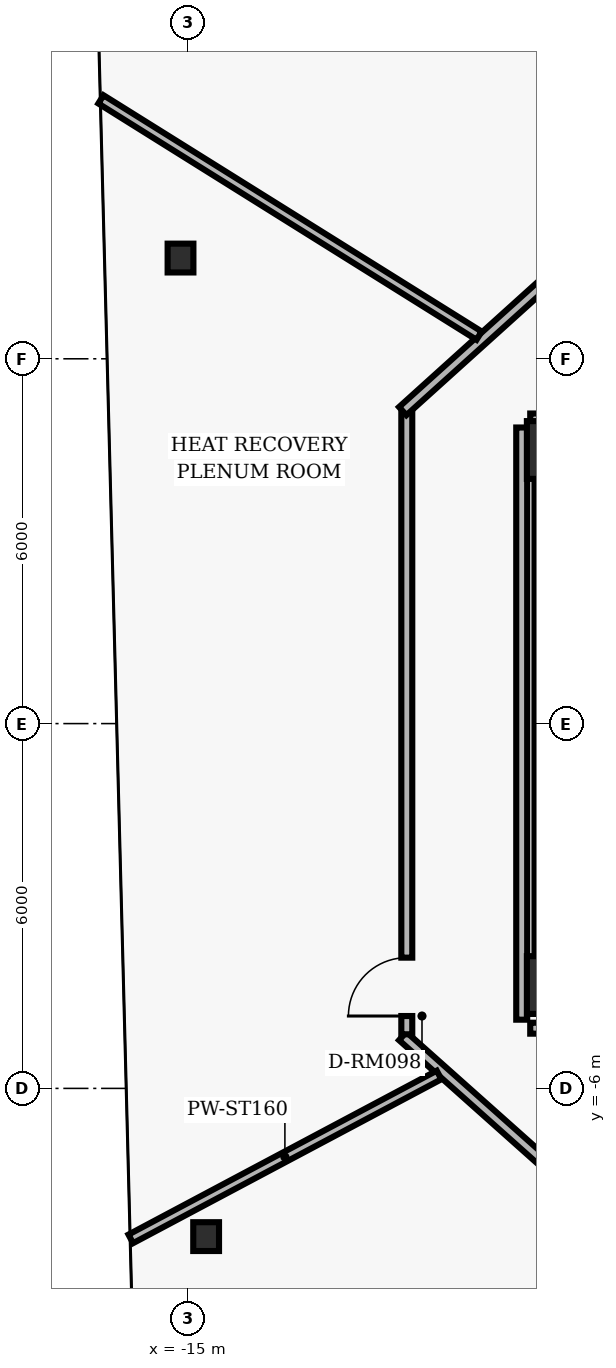
"""IFC4 building model, lengths in metres.
Left out: names, types, materials, properties, quantities, classifications, styles, units other than length and angle.
Written with IfcOpenShell. Run it as: python <this file> out.ifc"""

import sys

from ifc_helpers import new_model, si_unit, direction, frame, frame_2d, origin, origin_2d, place, context, subcontext, project, spatial, rectangle, hollow_rectangle, i_section, extrude, element, fill, save


model = new_model("IFC4")
c1 = context("Model", 3, precision=1e-05, world=origin(), true_north=direction((0.0, 1.0)))
c2 = subcontext(c1, "Body", "Model", "MODEL_VIEW")
j1 = project(units=[si_unit("LENGTHUNIT", "METRE"), si_unit("PLANEANGLEUNIT", "RADIAN")], contexts=[c1])
p1 = place(None, origin())
s1 = spatial("IfcSite", under=j1, at=p1, CompositionType="ELEMENT")
p2 = place(p1, origin())
s2 = spatial("IfcBuilding", under=s1, at=p2, CompositionType="ELEMENT")
p3 = place(p2, frame((0.0, 0.0, 45.76)))
s3 = spatial("IfcBuildingStorey", under=s2, at=p3, CompositionType="ELEMENT", Elevation=45.76)
for number, where, z_axis, x_axis in (
    (1, (-8.95, 4.5, 0.0), (0.0, 0.0, 1.0), (1.0, 0.0, 0.0)),
    (2, (-8.95, -4.3, 0.0), (0.0, 0.0, 1.0), (1.0, 0.0, 0.0)),
):
    element("IfcColumn", number, at=place(p3, frame(where, z_axis=z_axis, x_axis=x_axis)), inside=s3, PredefinedType="COLUMN", context=c2, shape_type="SweptSolid", body=[
        extrude(hollow_rectangle(XDim=0.95, YDim=0.95, WallThickness=0.06, InnerFilletRadius=0.02, OuterFilletRadius=0.04, at=origin_2d()), origin(), (0.0, 0.0, 1.0), 3.84),
    ])
p4 = place(p3, frame((-8.95, -3.825, 0.0), z_axis=(0.0, 0.0, 1.0), x_axis=(0.0, 1.0, 0.0)))
e3 = element("IfcWall", 3, at=p4, inside=s3, PredefinedType="SHEAR", context=c2, shape_type="SweptSolid", body=[
    extrude(rectangle(XDim=7.85, YDim=0.7, at=frame_2d((3.925, 0.0))), origin(), (0.0, 0.0, 1.0), 3.418),
])
for number, where, z_axis, x_axis in (
    (4, (-15.121, 7.657, 0.0), (0.0, 0.0, 1.0), (1.0, 0.0, 0.0)),
    (5, (-14.7, -8.438, 0.0), (0.0, 0.0, 1.0), (1.0, 0.0, 0.0)),
):
    element("IfcColumn", number, at=place(p3, frame(where, z_axis=z_axis, x_axis=x_axis)), inside=s3, PredefinedType="COLUMN", context=c2, shape_type="SweptSolid", body=[
        extrude(i_section(OverallWidth=0.424, OverallDepth=0.474, WebThickness=0.048, FlangeThickness=0.077, FilletRadius=0.025, at=origin_2d()), origin(), (0.0, 0.0, 1.0), 3.84),
    ])
p5 = place(p3, frame((-6.867, -9.24, 0.0), z_axis=(0.0, 0.0, 1.0), x_axis=(-0.746532095616, 0.665349404611, 0.0)))
e6 = element("IfcWall", 6, at=p5, inside=s3, PredefinedType="PARTITIONING", context=c2, shape_type="SweptSolid", body=[
    extrude(rectangle(XDim=6.162, YDim=0.18, at=frame_2d((3.081, 0.0))), origin(), (0.0, 0.0, 1.0), 3.393),
])
p6 = place(p3, frame((-11.4, -5.11, 0.0), z_axis=(0.0, 0.0, 1.0), x_axis=(0.0, 1.0, 0.0)))
e7 = element("IfcWall", 7, at=p6, inside=s3, PredefinedType="PARTITIONING", context=c2, shape_type="SweptSolid", body=[
    extrude(rectangle(XDim=10.22, YDim=0.18, at=frame_2d((5.11, 0.0))), origin(), (0.0, 0.0, 1.0), 3.393),
])
p7 = place(p6, frame((0.3, 0.0, 0.0)))
e8 = element("IfcOpeningElement", 8, at=p7, cuts=e7, PredefinedType="OPENING", context=c2, shape_type="SweptSolid", body=[
    extrude(rectangle(XDim=0.96, YDim=2.02, at=frame_2d((0.48, 1.01))), frame((0.0, 0.1, 0.0), z_axis=(0.0, -1.0, 0.0), x_axis=(1.0, 0.0, 0.0)), (0.0, 0.0, 1.0), 0.2),
])
p8 = place(p3, frame((-11.467, 5.14, 0.0), z_axis=(0.0, 0.0, 1.0), x_axis=(0.742486327971, 0.669861219042, 0.0)))
e9 = element("IfcWall", 9, at=p8, inside=s3, PredefinedType="PARTITIONING", context=c2, shape_type="SweptSolid", body=[
    extrude(rectangle(XDim=6.196, YDim=0.18, at=frame_2d((3.098, 0.0))), origin(), (0.0, 0.0, 1.0), 3.393),
])
p9 = place(p3, frame((-9.51, 4.87, 0.0), z_axis=(0.0, 0.0, 1.0), x_axis=(0.0, -1.0, 0.0)))
e10 = element("IfcWall", 10, at=p9, inside=s3, PredefinedType="PARTITIONING", context=c2, shape_type="SweptSolid", body=[
    extrude(rectangle(XDim=9.74, YDim=0.18, at=frame_2d((4.87, 0.0))), origin(), (0.0, 0.0, 1.0), 2.6),
])
p10 = place(p3, frame((-9.37, -5.01, 0.0), z_axis=(0.0, 0.0, 1.0), x_axis=(1.0, 0.0, 0.0)))
e11 = element("IfcWall", 11, at=p10, inside=s3, PredefinedType="PARTITIONING", context=c2, shape_type="SweptSolid", body=[
    extrude(rectangle(XDim=3.34, YDim=0.18, at=frame_2d((1.67, 0.0))), origin(), (0.0, 0.0, 1.0), 3.393),
])
p11 = place(p3, frame((-6.562, 5.01, 0.0), z_axis=(0.0, 0.0, 1.0), x_axis=(-1.0, 0.0, 0.0)))
e12 = element("IfcWall", 12, at=p11, inside=s3, PredefinedType="PARTITIONING", context=c2, shape_type="SweptSolid", body=[
    extrude(rectangle(XDim=2.808, YDim=0.18, at=frame_2d((1.404, 0.0))), origin(), (0.0, 0.0, 1.0), 3.393),
])
p12 = place(p3, frame((-10.87, -5.78, 0.0), z_axis=(0.0, 0.0, 1.0), x_axis=(-0.88294664721, -0.469473341288, 0.0)))
e13 = element("IfcWall", 13, at=p12, inside=s3, PredefinedType="PARTITIONING", context=c2, shape_type="SweptSolid", body=[
    extrude(rectangle(XDim=5.742, YDim=0.16, at=frame_2d((2.871, 0.0))), origin(), (0.0, 0.0, 1.0), 2.6),
])
p13 = place(p3, frame((-10.211, 6.381, 0.0), z_axis=(0.0, 0.0, 1.0), x_axis=(-0.848061887973, 0.529897192073, 0.0)))
e14 = element("IfcWall", 14, at=p13, inside=s3, PredefinedType="PARTITIONING", context=c2, shape_type="SweptSolid", body=[
    extrude(rectangle(XDim=7.333, YDim=0.16, at=frame_2d((3.667, 0.0))), origin(), (0.0, 0.0, 1.0), 3.393),
])
p14 = place(p7, origin())
e15 = element("IfcDoor", 15, at=p14, inside=s3, OperationType="SINGLE_SWING_LEFT", PredefinedType="DOOR", context=c2, shape_type="SweptSolid", body=[
    extrude(rectangle(XDim=0.96, YDim=2.02, at=frame_2d((0.48, 1.01))), frame((0.0, 0.025, 0.0), z_axis=(0.0, -1.0, 0.0), x_axis=(1.0, 0.0, 0.0)), (0.0, 0.0, 1.0), 0.05),
])
fill(e8, e15)
save(model, sys.argv[1])
